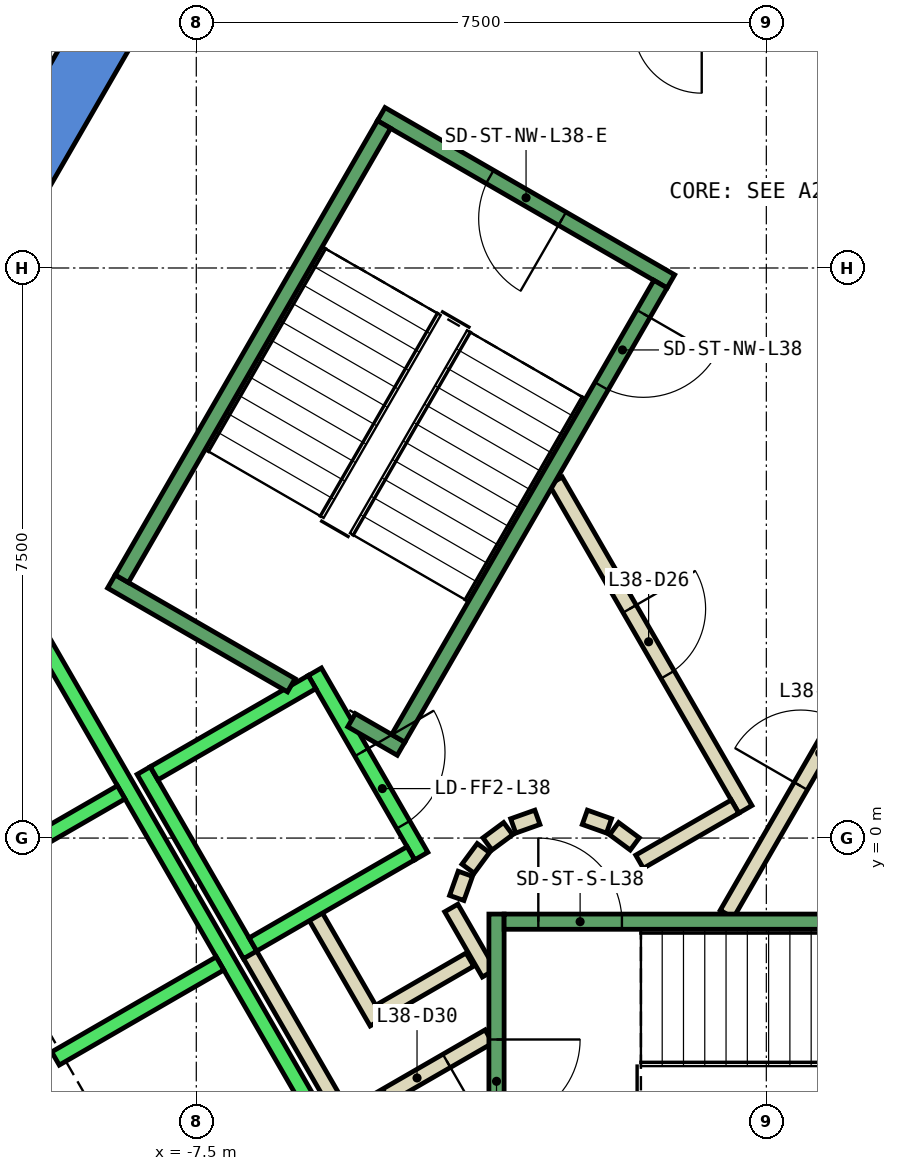
"""IFC4 building model, lengths in metres.
Left out: names, types, materials, properties, quantities, classifications, styles, units other than length and angle.
Written with IfcOpenShell. Run it as: python <this file> out.ifc"""

import sys

from ifc_helpers import new_model, si_unit, direction, frame, frame_2d, origin, place, context, subcontext, project, spatial, polyline, rectangle, outline, extrude, element, fill, save


model = new_model("IFC4")
c1 = context("Model", 3, precision=1e-05, world=origin(), true_north=direction((0.0, 1.0)))
c2 = subcontext(c1, "Body", "Model", "MODEL_VIEW")
j1 = project(units=[si_unit("LENGTHUNIT", "METRE"), si_unit("PLANEANGLEUNIT", "RADIAN")], contexts=[c1])
p1 = place(None, origin())
s1 = spatial("IfcSite", under=j1, at=p1, CompositionType="ELEMENT")
p2 = place(p1, origin())
s2 = spatial("IfcBuilding", under=s1, at=p2, CompositionType="ELEMENT")
p3 = place(p2, frame((0.0, 0.0, 171.8)))
s3 = spatial("IfcBuildingStorey", under=s2, at=p3, CompositionType="ELEMENT", Elevation=171.8)
p4 = place(p3, frame((0.0, 0.0, -0.4)))
e1 = element("IfcWall", 1, at=p4, inside=s3, PredefinedType="SHEAR", context=c2, shape_type="SweptSolid", body=[
    extrude(outline(polyline([(-12.267, 5.252), (-11.575, 4.852), (-6.466, 13.7), (-6.928, 14.5), (-12.267, 5.252)])), origin(), (0.0, 0.0, 1.0), 4.2),
])
p5 = place(p3, frame((0.0, 0.0, -0.4)))
e2 = element("IfcWall", 2, at=p5, inside=s3, PredefinedType="SHEAR", context=c2, shape_type="SweptSolid", body=[
    extrude(outline(polyline([(-13.856, 2.5), (-6.928, -9.5), (-6.466, -8.7), (-12.933, 2.5), (-13.856, 2.5)])), origin(), (0.0, 0.0, 1.0), 4.2),
])
p6 = place(p3, frame((-3.9, -1.599, 0.0), z_axis=(0.0, 0.0, 1.0), x_axis=(-0.865969445389, -0.500096910261, 0.0)))
e3 = element("IfcWall", 3, at=p6, inside=s3, PredefinedType="PARTITIONING", context=c2, shape_type="SweptSolid", body=[
    extrude(rectangle(XDim=1.373, YDim=0.2, at=frame_2d((0.687, 0.0))), origin(), (0.0, 0.0, 1.0), 3.8),
])
p7 = place(p3, frame((-5.126, -2.422, 0.0), z_axis=(0.0, 0.0, 1.0), x_axis=(-0.500062241894, 0.865989465428, 0.0)))
e4 = element("IfcWall", 4, at=p7, inside=s3, PredefinedType="PARTITIONING", context=c2, shape_type="SweptSolid", body=[
    extrude(rectangle(XDim=1.7, YDim=0.2, at=frame_2d((0.85, 0.0))), origin(), (0.0, 0.0, 1.0), 3.8),
])
p8 = place(p3, frame((-3.65, -2.61, 0.0), z_axis=(0.0, 0.0, 1.0), x_axis=(-0.866072462134, -0.499918483688, 0.0)))
e5 = element("IfcWall", 5, at=p8, inside=s3, PredefinedType="PARTITIONING", context=c2, shape_type="SweptSolid", body=[
    extrude(rectangle(XDim=2.084, YDim=0.2, at=frame_2d((1.042, 0.0))), origin(), (0.0, 0.0, 1.0), 3.8),
])
p9 = place(p8, frame((0.642, 0.0, 0.0)))
e6 = element("IfcOpeningElement", 6, at=p9, cuts=e5, PredefinedType="OPENING", context=c2, shape_type="SweptSolid", body=[
    extrude(rectangle(XDim=0.9, YDim=2.1, at=frame_2d((0.45, 1.05))), frame((0.0, 0.11, 0.0), z_axis=(0.0, -1.0, 0.0), x_axis=(1.0, 0.0, 0.0)), (0.0, 0.0, 1.0), 0.22),
])
p10 = place(p3, frame((-5.492, -3.788, 0.0), z_axis=(0.0, 0.0, 1.0), x_axis=(-0.500008949224, 0.866020236886, 0.0)))
e7 = element("IfcWall", 7, at=p10, inside=s3, PredefinedType="PARTITIONING", context=c2, shape_type="SweptSolid", body=[
    extrude(rectangle(XDim=2.68, YDim=0.2, at=frame_2d((1.34, 0.0))), origin(), (0.0, 0.0, 1.0), 3.8),
])
p11 = place(p3, frame((-4.145, -0.92, 0.0), z_axis=(0.0, 0.0, 1.0), x_axis=(0.499743786207, -0.866173278362, 0.0)))
e8 = element("IfcWall", 8, at=p11, inside=s3, PredefinedType="PARTITIONING", context=c2, shape_type="SweptSolid", body=[
    extrude(rectangle(XDim=0.991, YDim=0.2, at=frame_2d((0.495, 0.0))), origin(), (0.0, 0.0, 1.0), 3.8),
])
p12 = place(p3, frame((-0.52, -1.0, 0.0), z_axis=(0.0, 0.0, 1.0), x_axis=(0.50011622646, 0.865958290007, 0.0)))
e9 = element("IfcWall", 9, at=p12, inside=s3, PredefinedType="PARTITIONING", context=c2, shape_type="SweptSolid", body=[
    extrude(rectangle(XDim=4.991, YDim=0.2, at=frame_2d((2.496, 0.0))), origin(), (0.0, 0.0, 1.0), 3.8),
])
p13 = place(p12, frame((1.945, 0.0, 0.0)))
e10 = element("IfcOpeningElement", 10, at=p13, cuts=e9, PredefinedType="OPENING", context=c2, shape_type="SweptSolid", body=[
    extrude(rectangle(XDim=1.0, YDim=2.1, at=frame_2d((0.5, 1.05))), frame((0.0, 0.11, 0.0), z_axis=(0.0, -1.0, 0.0), x_axis=(1.0, 0.0, 0.0)), (0.0, 0.0, 1.0), 0.22),
])
p14 = place(p3, frame((-2.771, 4.7, 0.0), z_axis=(0.0, 0.0, 1.0), x_axis=(0.499969479948, -0.866043023828, 0.0)))
e11 = element("IfcWall", 11, at=p14, inside=s3, PredefinedType="PARTITIONING", context=c2, shape_type="SweptSolid", body=[
    extrude(rectangle(XDim=4.99, YDim=0.2, at=frame_2d((2.495, 0.0))), origin(), (0.0, 0.0, 1.0), 3.8),
])
p15 = place(p14, frame((1.945, 0.0, 0.0)))
e12 = element("IfcOpeningElement", 12, at=p15, cuts=e11, PredefinedType="OPENING", context=c2, shape_type="SweptSolid", body=[
    extrude(rectangle(XDim=1.0, YDim=2.1, at=frame_2d((0.5, 1.05))), frame((0.0, 0.11, 0.0), z_axis=(0.0, -1.0, 0.0), x_axis=(1.0, 0.0, 0.0)), (0.0, 0.0, 1.0), 0.22),
])
p16 = place(p3, frame((-0.412, 0.414, 0.0), z_axis=(0.0, 0.0, 1.0), x_axis=(-0.866017369001, -0.500013916395, 0.0)))
e13 = element("IfcWall", 13, at=p16, inside=s3, PredefinedType="PARTITIONING", context=c2, shape_type="SweptSolid", body=[
    extrude(rectangle(XDim=1.45, YDim=0.2, at=frame_2d((0.725, 0.0))), origin(), (0.0, 0.0, 1.0), 3.8),
])
p17 = place(p3, frame((-1.731, -0.077, 0.0), z_axis=(0.0, 0.0, 1.0), x_axis=(-0.804311165252, 0.594208338422, 0.0)))
e14 = element("IfcWall", 14, at=p17, inside=s3, PredefinedType="PARTITIONING", context=c2, shape_type="SweptSolid", body=[
    extrude(rectangle(XDim=0.338, YDim=0.2, at=frame_2d((0.169, 0.0))), origin(), (0.0, 0.0, 1.0), 3.8),
])
p18 = place(p3, frame((-2.07, 0.16, 0.0), z_axis=(0.0, 0.0, 1.0), x_axis=(-0.942199461132, 0.335052496547, 0.0)))
e15 = element("IfcWall", 15, at=p18, inside=s3, PredefinedType="PARTITIONING", context=c2, shape_type="SweptSolid", body=[
    extrude(rectangle(XDim=0.337, YDim=0.2, at=frame_2d((0.169, 0.0))), origin(), (0.0, 0.0, 1.0), 3.8),
])
p19 = place(p3, frame((-3.012, 0.273, 0.0), z_axis=(0.0, 0.0, 1.0), x_axis=(-0.942280615813, -0.334824194261, 0.0)))
e16 = element("IfcWall", 16, at=p19, inside=s3, PredefinedType="PARTITIONING", context=c2, shape_type="SweptSolid", body=[
    extrude(rectangle(XDim=0.338, YDim=0.2, at=frame_2d((0.169, 0.0))), origin(), (0.0, 0.0, 1.0), 3.8),
])
p20 = place(p3, frame((-3.397, 0.124, 0.0), z_axis=(0.0, 0.0, 1.0), x_axis=(-0.804311165252, -0.594208338422, 0.0)))
e17 = element("IfcWall", 17, at=p20, inside=s3, PredefinedType="PARTITIONING", context=c2, shape_type="SweptSolid", body=[
    extrude(rectangle(XDim=0.338, YDim=0.2, at=frame_2d((0.169, 0.0))), origin(), (0.0, 0.0, 1.0), 3.8),
])
p21 = place(p3, frame((-3.723, -0.131, 0.0), z_axis=(0.0, 0.0, 1.0), x_axis=(-0.594675113454, -0.803966112121, 0.0)))
e18 = element("IfcWall", 18, at=p21, inside=s3, PredefinedType="PARTITIONING", context=c2, shape_type="SweptSolid", body=[
    extrude(rectangle(XDim=0.338, YDim=0.2, at=frame_2d((0.169, 0.0))), origin(), (0.0, 0.0, 1.0), 3.8),
])
p22 = place(p3, frame((-3.96, -0.47, 0.0), z_axis=(0.0, 0.0, 1.0), x_axis=(-0.334824194261, -0.942280615813, 0.0)))
e19 = element("IfcWall", 19, at=p22, inside=s3, PredefinedType="PARTITIONING", context=c2, shape_type="SweptSolid", body=[
    extrude(rectangle(XDim=0.338, YDim=0.2, at=frame_2d((0.169, 0.0))), origin(), (0.0, 0.0, 1.0), 3.8),
])
p23 = place(p3, frame((-5.94, 2.188, 0.0), z_axis=(0.0, 0.0, 1.0), x_axis=(0.49994636267, -0.866056369097, 0.0)))
e20 = element("IfcWall", 20, at=p23, inside=s3, PredefinedType="STANDARD", context=c2, shape_type="SweptSolid", body=[
    extrude(rectangle(XDim=2.8, YDim=0.2, at=frame_2d((1.4, 0.0))), origin(), (0.0, 0.0, 1.0), 3.8),
])
p24 = place(p23, frame((1.225, 0.0, 0.0)))
e21 = element("IfcOpeningElement", 21, at=p24, cuts=e20, PredefinedType="OPENING", context=c2, shape_type="SweptSolid", body=[
    extrude(rectangle(XDim=1.1, YDim=2.1, at=frame_2d((0.55, 1.05))), frame((0.0, 0.11, 0.0), z_axis=(0.0, -1.0, 0.0), x_axis=(1.0, 0.0, 0.0)), (0.0, 0.0, 1.0), 0.22),
])
p25 = place(p3, frame((-8.192, 0.888, 0.0), z_axis=(0.0, 0.0, 1.0), x_axis=(0.49994636267, -0.866056369097, 0.0)))
e22 = element("IfcWall", 22, at=p25, inside=s3, PredefinedType="STANDARD", context=c2, shape_type="SweptSolid", body=[
    extrude(rectangle(XDim=2.8, YDim=0.2, at=frame_2d((1.4, 0.0))), origin(), (0.0, 0.0, 1.0), 3.8),
])
for number, where, z_axis, x_axis in (
    (23, (-5.977, 2.052, 0.0), (0.0, 0.0, 1.0), (-0.866, -0.5, 0.0)),
    (24, (-4.677, -0.2, 0.0), (0.0, 0.0, 1.0), (-0.866, -0.5, 0.0)),
):
    element("IfcWall", number, at=place(p3, frame(where, z_axis=z_axis, x_axis=x_axis)), inside=s3, PredefinedType="STANDARD", context=c2, shape_type="SweptSolid", body=[
        extrude(rectangle(XDim=2.399, YDim=0.2, at=frame_2d((1.2, 0.0))), origin(), (0.0, 0.0, 1.0), 3.8),
    ])
p26 = place(p3, frame((-9.751, 2.99, 0.0), z_axis=(0.0, 0.0, 1.0), x_axis=(0.50000090737, -0.866024879913, 0.0)))
e25 = element("IfcWall", 25, at=p26, inside=s3, PredefinedType="STANDARD", context=c2, shape_type="SweptSolid", body=[
    extrude(rectangle(XDim=10.6, YDim=0.2, at=frame_2d((5.3, 0.0))), origin(), (0.0, 0.0, 1.0), 3.8),
])
for number, where, z_axis, x_axis in (
    (26, (-8.488, 0.602, 0.0), (0.0, 0.0, 1.0), (-0.866, -0.5, 0.0)),
    (27, (-7.188, -1.65, 0.0), (0.0, 0.0, 1.0), (-0.866, -0.5, 0.0)),
):
    element("IfcWall", number, at=place(p3, frame(where, z_axis=z_axis, x_axis=x_axis)), inside=s3, PredefinedType="STANDARD", context=c2, shape_type="SweptSolid", body=[
        extrude(rectangle(XDim=2.5, YDim=0.2, at=frame_2d((1.25, 0.0))), origin(), (0.0, 0.0, 1.0), 3.8),
    ])
p27 = place(p3, frame((-3.55, -1.0, 0.0), z_axis=(0.0, 0.0, 1.0), x_axis=(0.0, -1.0, 0.0)))
e28 = element("IfcWall", 28, at=p27, inside=s3, PredefinedType="STANDARD", context=c2, shape_type="SweptSolid", body=[
    extrude(rectangle(XDim=4.4, YDim=0.2, at=frame_2d((2.2, 0.0))), origin(), (0.0, 0.0, 1.0), 3.8),
])
p28 = place(p27, frame((1.65, 0.0, 0.0)))
e29 = element("IfcOpeningElement", 29, at=p28, cuts=e28, PredefinedType="OPENING", context=c2, shape_type="SweptSolid", body=[
    extrude(rectangle(XDim=1.1, YDim=2.2, at=frame_2d((0.55, 1.1))), frame((0.0, 0.11, 0.0), z_axis=(0.0, -1.0, 0.0), x_axis=(1.0, 0.0, 0.0)), (0.0, 0.0, 1.0), 0.22),
])
p29 = place(p3, frame((-3.45, -1.1, 0.0), z_axis=(0.0, 0.0, 1.0), x_axis=(1.0, 0.0, 0.0)))
e30 = element("IfcWall", 30, at=p29, inside=s3, PredefinedType="STANDARD", context=c2, shape_type="SweptSolid", body=[
    extrude(rectangle(XDim=6.9, YDim=0.2, at=frame_2d((3.45, 0.0))), origin(), (0.0, 0.0, 1.0), 3.8),
])
p30 = place(p29, frame((0.45, 0.0, 0.0)))
e31 = element("IfcOpeningElement", 31, at=p30, cuts=e30, PredefinedType="OPENING", context=c2, shape_type="SweptSolid", body=[
    extrude(rectangle(XDim=1.1, YDim=2.2, at=frame_2d((0.55, 1.1))), frame((0.0, 0.11, 0.0), z_axis=(0.0, -1.0, 0.0), x_axis=(1.0, 0.0, 0.0)), (0.0, 0.0, 1.0), 0.22),
])
p31 = place(p3, frame((-1.256, 7.324, 0.0), z_axis=(0.0, 0.0, 1.0), x_axis=(-0.866046073146, 0.499964197906, 0.0)))
e32 = element("IfcWall", 32, at=p31, inside=s3, PredefinedType="STANDARD", context=c2, shape_type="SweptSolid", body=[
    extrude(rectangle(XDim=4.4, YDim=0.2, at=frame_2d((2.2, 0.0))), origin(), (0.0, 0.0, 1.0), 3.8),
])
p32 = place(p31, frame((1.65, 0.0, 0.0)))
e33 = element("IfcOpeningElement", 33, at=p32, cuts=e32, PredefinedType="OPENING", context=c2, shape_type="SweptSolid", body=[
    extrude(rectangle(XDim=1.1, YDim=2.2, at=frame_2d((0.55, 1.1))), frame((0.0, 0.11, 0.0), z_axis=(0.0, -1.0, 0.0), x_axis=(1.0, 0.0, 0.0)), (0.0, 0.0, 1.0), 0.22),
])
p33 = place(p3, frame((-6.25, 2.01, 0.0), z_axis=(0.0, 0.0, 1.0), x_axis=(-0.86611865017, 0.499838457731, 0.0)))
e34 = element("IfcWall", 34, at=p33, inside=s3, PredefinedType="STANDARD", context=c2, shape_type="SweptSolid", body=[
    extrude(rectangle(XDim=2.733, YDim=0.2, at=frame_2d((1.366, 0.0))), origin(), (0.0, 0.0, 1.0), 3.8),
])
p34 = place(p3, frame((-4.806, 1.176, 0.0), z_axis=(0.0, 0.0, 1.0), x_axis=(-0.866558586415, 0.499075361355, 0.0)))
e35 = element("IfcWall", 35, at=p34, inside=s3, PredefinedType="STANDARD", context=c2, shape_type="SweptSolid", body=[
    extrude(rectangle(XDim=0.751, YDim=0.2, at=frame_2d((0.376, 0.0))), origin(), (0.0, 0.0, 1.0), 3.8),
])
p35 = place(p3, frame((-1.393, 7.288, 0.0), z_axis=(0.0, 0.0, 1.0), x_axis=(-0.499963383562, -0.866046543262, 0.0)))
e36 = element("IfcWall", 36, at=p35, inside=s3, PredefinedType="STANDARD", context=c2, shape_type="SweptSolid", body=[
    extrude(rectangle(XDim=6.9, YDim=0.2, at=frame_2d((3.45, 0.0))), origin(), (0.0, 0.0, 1.0), 3.8),
])
p36 = place(p35, frame((0.45, 0.0, 0.0)))
e37 = element("IfcOpeningElement", 37, at=p36, cuts=e36, PredefinedType="OPENING", context=c2, shape_type="SweptSolid", body=[
    extrude(rectangle(XDim=1.1, YDim=2.2, at=frame_2d((0.55, 1.1))), frame((0.0, 0.11, 0.0), z_axis=(0.0, -1.0, 0.0), x_axis=(1.0, 0.0, 0.0)), (0.0, 0.0, 1.0), 0.22),
])
p37 = place(p3, frame((-5.03, 9.388, 0.0), z_axis=(0.0, 0.0, 1.0), x_axis=(-0.499978703459, -0.866037698999, 0.0)))
e38 = element("IfcWall", 38, at=p37, inside=s3, PredefinedType="STANDARD", context=c2, shape_type="SweptSolid", body=[
    extrude(rectangle(XDim=6.9, YDim=0.2, at=frame_2d((3.45, 0.0))), origin(), (0.0, 0.0, 1.0), 3.8),
])
p38 = place(p13, origin())
e39 = element("IfcDoor", 39, at=p38, inside=s3, OperationType="SINGLE_SWING_LEFT", PredefinedType="DOOR", context=c2, shape_type="SweptSolid", body=[
    extrude(rectangle(XDim=1.0, YDim=2.1, at=frame_2d((0.5, 1.05))), frame((0.0, 0.025, 0.0), z_axis=(0.0, -1.0, 0.0), x_axis=(1.0, 0.0, 0.0)), (0.0, 0.0, 1.0), 0.05),
])
fill(e10, e39)
p39 = place(p15, origin())
e40 = element("IfcDoor", 40, at=p39, inside=s3, OperationType="SINGLE_SWING_RIGHT", PredefinedType="DOOR", context=c2, shape_type="SweptSolid", body=[
    extrude(rectangle(XDim=1.0, YDim=2.1, at=frame_2d((0.5, 1.05))), frame((0.0, 0.025, 0.0), z_axis=(0.0, -1.0, 0.0), x_axis=(1.0, 0.0, 0.0)), (0.0, 0.0, 1.0), 0.05),
])
fill(e12, e40)
p40 = place(p9, origin())
e41 = element("IfcDoor", 41, at=p40, inside=s3, OperationType="SINGLE_SWING_LEFT", PredefinedType="DOOR", context=c2, shape_type="SweptSolid", body=[
    extrude(rectangle(XDim=0.9, YDim=2.1, at=frame_2d((0.45, 1.05))), frame((0.0, 0.025, 0.0), z_axis=(0.0, -1.0, 0.0), x_axis=(1.0, 0.0, 0.0)), (0.0, 0.0, 1.0), 0.05),
])
fill(e6, e41)
p41 = place(p24, origin())
e42 = element("IfcDoor", 42, at=p41, inside=s3, OperationType="SLIDING_TO_LEFT", PredefinedType="DOOR", context=c2, shape_type="SweptSolid", body=[
    extrude(rectangle(XDim=1.1, YDim=2.1, at=frame_2d((0.55, 1.05))), frame((0.0, 0.025, 0.0), z_axis=(0.0, -1.0, 0.0), x_axis=(1.0, 0.0, 0.0)), (0.0, 0.0, 1.0), 0.05),
])
fill(e21, e42)
p42 = place(p30, origin())
e43 = element("IfcDoor", 43, at=p42, inside=s3, OperationType="SINGLE_SWING_LEFT", PredefinedType="DOOR", context=c2, shape_type="SweptSolid", body=[
    extrude(rectangle(XDim=1.1, YDim=2.2, at=frame_2d((0.55, 1.1))), frame((0.0, 0.025, 0.0), z_axis=(0.0, -1.0, 0.0), x_axis=(1.0, 0.0, 0.0)), (0.0, 0.0, 1.0), 0.05),
])
fill(e31, e43)
p43 = place(p28, origin())
e44 = element("IfcDoor", 44, at=p43, inside=s3, OperationType="SINGLE_SWING_LEFT", PredefinedType="DOOR", context=c2, shape_type="SweptSolid", body=[
    extrude(rectangle(XDim=1.1, YDim=2.2, at=frame_2d((0.55, 1.1))), frame((0.0, 0.025, 0.0), z_axis=(0.0, -1.0, 0.0), x_axis=(1.0, 0.0, 0.0)), (0.0, 0.0, 1.0), 0.05),
])
fill(e29, e44)
p44 = place(p36, origin())
e45 = element("IfcDoor", 45, at=p44, inside=s3, OperationType="SINGLE_SWING_LEFT", PredefinedType="DOOR", context=c2, shape_type="SweptSolid", body=[
    extrude(rectangle(XDim=1.1, YDim=2.2, at=frame_2d((0.55, 1.1))), frame((0.0, 0.025, 0.0), z_axis=(0.0, -1.0, 0.0), x_axis=(1.0, 0.0, 0.0)), (0.0, 0.0, 1.0), 0.05),
])
fill(e37, e45)
p45 = place(p32, origin())
e46 = element("IfcDoor", 46, at=p45, inside=s3, OperationType="SINGLE_SWING_LEFT", PredefinedType="DOOR", context=c2, shape_type="SweptSolid", body=[
    extrude(rectangle(XDim=1.1, YDim=2.2, at=frame_2d((0.55, 1.1))), frame((0.0, 0.025, 0.0), z_axis=(0.0, -1.0, 0.0), x_axis=(1.0, 0.0, 0.0)), (0.0, 0.0, 1.0), 0.05),
])
fill(e33, e46)
save(model, sys.argv[1])
